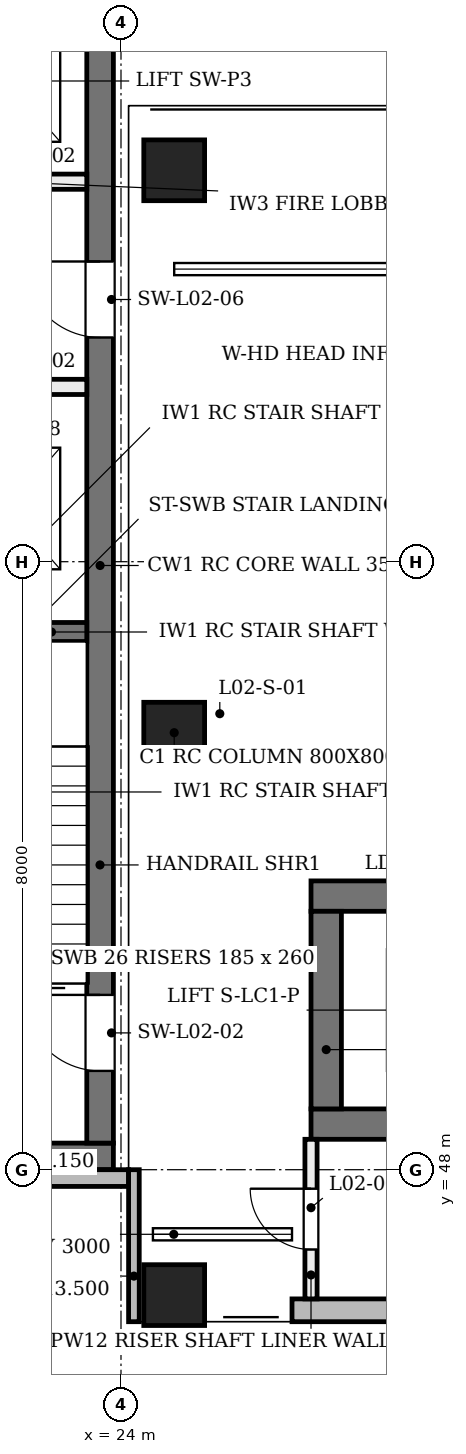
"""IFC4 building model, lengths in metres.
Left out: names, types, materials, properties, quantities, classifications, styles, units other than length and angle.
Written with IfcOpenShell. Run it as: python <this file> out.ifc"""

import sys

from ifc_helpers import new_model, si_unit, direction, frame, frame_2d, origin, origin_2d, place, context, subcontext, project, spatial, rectangle, extrude, element, fill, save


model = new_model("IFC4")
c1 = context("Model", 3, precision=1e-05, world=origin(), true_north=direction((0.0, 1.0)))
c2 = subcontext(c1, "Body", "Model", "MODEL_VIEW")
j1 = project(units=[si_unit("LENGTHUNIT", "METRE"), si_unit("PLANEANGLEUNIT", "RADIAN")], contexts=[c1])
p1 = place(None, origin())
s1 = spatial("IfcSite", under=j1, at=p1, CompositionType="ELEMENT")
p2 = place(p1, origin())
s2 = spatial("IfcBuilding", under=s1, at=p2, CompositionType="ELEMENT")
p3 = place(p2, frame((0.0, 0.0, 9.6)))
s3 = spatial("IfcBuildingStorey", under=s2, at=p3, CompositionType="ELEMENT", Elevation=9.6)
p4 = place(p3, frame((26.5, 48.6, 0.0), z_axis=(0.0, 0.0, 1.0), x_axis=(1.0, 0.0, 0.0)))
e1 = element("IfcWall", 1, at=p4, inside=s3, PredefinedType="SHEAR", context=c2, shape_type="SweptSolid", body=[
    extrude(rectangle(XDim=6.0, YDim=0.4, at=frame_2d((3.0, 0.0))), origin(), (0.0, 0.0, 1.0), 4.58),
])
p5 = place(p3, frame((26.5, 51.6, 0.0), z_axis=(0.0, 0.0, 1.0), x_axis=(1.0, 0.0, 0.0)))
e2 = element("IfcWall", 2, at=p5, inside=s3, PredefinedType="SHEAR", context=c2, shape_type="SweptSolid", body=[
    extrude(rectangle(XDim=6.0, YDim=0.4, at=frame_2d((3.0, 0.0))), origin(), (0.0, 0.0, 1.0), 4.58),
])
p6 = place(p5, frame((1.15, 0.0, 0.0)))
e3 = element("IfcOpeningElement", 3, at=p6, cuts=e2, PredefinedType="OPENING", context=c2, shape_type="SweptSolid", body=[
    extrude(rectangle(XDim=1.1, YDim=2.1, at=frame_2d((0.55, 1.05))), frame((0.0, 0.21, 0.0), z_axis=(0.0, -1.0, 0.0), x_axis=(1.0, 0.0, 0.0)), (0.0, 0.0, 1.0), 0.42),
])
p7 = place(p5, frame((3.75, 0.0, 0.0)))
e4 = element("IfcOpeningElement", 4, at=p7, cuts=e2, PredefinedType="OPENING", context=c2, shape_type="SweptSolid", body=[
    extrude(rectangle(XDim=1.1, YDim=2.1, at=frame_2d((0.55, 1.05))), frame((0.0, 0.21, 0.0), z_axis=(0.0, -1.0, 0.0), x_axis=(1.0, 0.0, 0.0)), (0.0, 0.0, 1.0), 0.42),
])
p8 = place(p3, frame((26.7, 48.8, 0.0), z_axis=(0.0, 0.0, 1.0), x_axis=(0.0, 1.0, 0.0)))
e5 = element("IfcWall", 5, at=p8, inside=s3, PredefinedType="SHEAR", context=c2, shape_type="SweptSolid", body=[
    extrude(rectangle(XDim=2.6, YDim=0.4, at=frame_2d((1.3, 0.0))), origin(), (0.0, 0.0, 1.0), 4.58),
])
p9 = place(p3, frame((16.0, 48.175, 0.0), z_axis=(0.0, 0.0, 1.0), x_axis=(1.0, 0.0, 0.0)))
e6 = element("IfcWall", 6, at=p9, inside=s3, PredefinedType="SHEAR", context=c2, shape_type="SweptSolid", body=[
    extrude(rectangle(XDim=7.9, YDim=0.35, at=frame_2d((3.95, 0.0))), origin(), (0.0, 0.0, 1.0), 4.58),
])
p10 = place(p3, frame((23.725, 48.35, 0.0), z_axis=(0.0, 0.0, 1.0), x_axis=(0.0, 1.0, 0.0)))
e7 = element("IfcWall", 7, at=p10, inside=s3, PredefinedType="SHEAR", context=c2, shape_type="SweptSolid", body=[
    extrude(rectangle(XDim=15.2, YDim=0.35, at=frame_2d((7.6, 0.0))), origin(), (0.0, 0.0, 1.0), 4.58),
])
p11 = place(p10, frame((0.95, 0.0, 0.0)))
e8 = element("IfcOpeningElement", 8, at=p11, cuts=e7, PredefinedType="OPENING", context=c2, shape_type="SweptSolid", body=[
    extrude(rectangle(XDim=1.0, YDim=2.1, at=frame_2d((0.5, 1.05))), frame((0.0, 0.185, 0.0), z_axis=(0.0, -1.0, 0.0), x_axis=(1.0, 0.0, 0.0)), (0.0, 0.0, 1.0), 0.37),
])
p12 = place(p10, frame((10.6, 0.0, 0.0)))
e9 = element("IfcOpeningElement", 9, at=p12, cuts=e7, PredefinedType="OPENING", context=c2, shape_type="SweptSolid", body=[
    extrude(rectangle(XDim=1.0, YDim=2.1, at=frame_2d((0.5, 1.05))), frame((0.0, 0.185, 0.0), z_axis=(0.0, -1.0, 0.0), x_axis=(1.0, 0.0, 0.0)), (0.0, 0.0, 1.0), 0.37),
])
for number, where, z_axis, x_axis in (
    (10, (24.7, 46.6, 0.0), (0.0, -0.204, 0.979), (1.0, 0.0, 0.0)),
    (11, (24.7, 54.0, 0.0), (0.0, -0.204, 0.979), (1.0, 0.0, 0.0)),
    (12, (24.7, 61.4, 0.0), (0.0, -0.204, 0.979), (1.0, 0.0, 0.0)),
):
    element("IfcColumn", number, at=place(p3, frame(where, z_axis=z_axis, x_axis=x_axis)), inside=s3, PredefinedType="COLUMN", context=c2, shape_type="SweptSolid", body=[
        extrude(rectangle(XDim=0.8, YDim=0.8, at=origin_2d()), origin(), (0.0, 0.0, 1.0), 4.903),
    ])
p13 = place(p3, frame((26.25, 46.15, 0.0), z_axis=(0.0, 0.0, 1.0), x_axis=(1.0, 0.0, 0.0)))
e13 = element("IfcWall", 13, at=p13, inside=s3, PredefinedType="SOLIDWALL", context=c2, shape_type="SweptSolid", body=[
    extrude(rectangle(XDim=6.5, YDim=0.3, at=frame_2d((3.25, 0.0))), origin(), (0.0, 0.0, 1.0), 3.9),
])
p14 = place(p3, frame((24.9, 59.85, 4.1), z_axis=(0.0, 0.0, 1.0), x_axis=(1.0, 0.0, 0.0)))
e14 = element("IfcWall", 14, at=p14, inside=s3, PredefinedType="SOLIDWALL", context=c2, shape_type="SweptSolid", body=[
    extrude(rectangle(XDim=6.9, YDim=0.15, at=frame_2d((3.45, 0.0))), origin(), (0.0, 0.0, 1.0), 0.48),
])
p15 = place(p3, frame((15.9, 47.89, 0.0), z_axis=(0.0, 0.0, 1.0), x_axis=(1.0, 0.0, 0.0)))
e15 = element("IfcWall", 15, at=p15, inside=s3, PredefinedType="SOLIDWALL", context=c2, shape_type="SweptSolid", body=[
    extrude(rectangle(XDim=8.2, YDim=0.22, at=frame_2d((4.1, 0.0))), origin(), (0.0, 0.0, 1.0), 3.9),
])
p16 = place(p15, frame((1.108, 0.0, 0.9)))
e16 = element("IfcOpeningElement", 16, at=p16, cuts=e15, PredefinedType="OPENING", context=c2, shape_type="SweptSolid", body=[
    extrude(rectangle(XDim=0.45, YDim=2.6, at=frame_2d((0.225, 1.3))), frame((0.0, 0.12, 0.0), z_axis=(0.0, -1.0, 0.0), x_axis=(1.0, 0.0, 0.0)), (0.0, 0.0, 1.0), 0.24),
])
p17 = place(p15, frame((3.775, 0.0, 0.9)))
e17 = element("IfcOpeningElement", 17, at=p17, cuts=e15, PredefinedType="OPENING", context=c2, shape_type="SweptSolid", body=[
    extrude(rectangle(XDim=0.45, YDim=2.6, at=frame_2d((0.225, 1.3))), frame((0.0, 0.12, 0.0), z_axis=(0.0, -1.0, 0.0), x_axis=(1.0, 0.0, 0.0)), (0.0, 0.0, 1.0), 0.24),
])
p18 = place(p15, frame((6.442, 0.0, 0.9)))
e18 = element("IfcOpeningElement", 18, at=p18, cuts=e15, PredefinedType="OPENING", context=c2, shape_type="SweptSolid", body=[
    extrude(rectangle(XDim=0.45, YDim=2.6, at=frame_2d((0.225, 1.3))), frame((0.0, 0.12, 0.0), z_axis=(0.0, -1.0, 0.0), x_axis=(1.0, 0.0, 0.0)), (0.0, 0.0, 1.0), 0.24),
])
p19 = place(p3, frame((24.17, 46.0, 0.0), z_axis=(0.0, 0.0, 1.0), x_axis=(0.0, 1.0, 0.0)))
e19 = element("IfcWall", 19, at=p19, inside=s3, PredefinedType="SOLIDWALL", context=c2, shape_type="SweptSolid", body=[
    extrude(rectangle(XDim=2.0, YDim=0.14, at=frame_2d((1.0, 0.0))), origin(), (0.0, 0.0, 1.0), 3.9),
])
p20 = place(p3, frame((20.45, 55.075, 0.0), z_axis=(0.0, 0.0, 1.0), x_axis=(1.0, 0.0, 0.0)))
e20 = element("IfcWall", 20, at=p20, inside=s3, PredefinedType="SOLIDWALL", context=c2, shape_type="SweptSolid", body=[
    extrude(rectangle(XDim=3.1, YDim=0.25, at=frame_2d((1.55, 0.0))), origin(), (0.0, 0.0, 1.0), 4.55),
])
p21 = place(p3, frame((16.35, 58.3, 0.0), z_axis=(0.0, 0.0, 1.0), x_axis=(1.0, 0.0, 0.0)))
e21 = element("IfcWall", 21, at=p21, inside=s3, PredefinedType="SOLIDWALL", context=c2, shape_type="SweptSolid", body=[
    extrude(rectangle(XDim=7.2, YDim=0.2, at=frame_2d((3.6, 0.0))), origin(), (0.0, 0.0, 1.0), 4.55),
])
p22 = place(p21, frame((0.5, 0.0, 0.0)))
e22 = element("IfcOpeningElement", 22, at=p22, cuts=e21, PredefinedType="OPENING", context=c2, shape_type="SweptSolid", body=[
    extrude(rectangle(XDim=1.1, YDim=2.1, at=frame_2d((0.55, 1.05))), frame((0.0, 0.11, 0.0), z_axis=(0.0, -1.0, 0.0), x_axis=(1.0, 0.0, 0.0)), (0.0, 0.0, 1.0), 0.22),
])
p23 = place(p21, frame((5.6, 0.0, 0.0)))
e23 = element("IfcOpeningElement", 23, at=p23, cuts=e21, PredefinedType="OPENING", context=c2, shape_type="SweptSolid", body=[
    extrude(rectangle(XDim=1.1, YDim=2.1, at=frame_2d((0.55, 1.05))), frame((0.0, 0.11, 0.0), z_axis=(0.0, -1.0, 0.0), x_axis=(1.0, 0.0, 0.0)), (0.0, 0.0, 1.0), 0.22),
])
p24 = place(p21, frame((3.1, 0.0, 0.0)))
e24 = element("IfcOpeningElement", 24, at=p24, cuts=e21, PredefinedType="OPENING", context=c2, shape_type="SweptSolid", body=[
    extrude(rectangle(XDim=1.0, YDim=2.1, at=frame_2d((0.5, 1.05))), frame((0.0, 0.11, 0.0), z_axis=(0.0, -1.0, 0.0), x_axis=(1.0, 0.0, 0.0)), (0.0, 0.0, 1.0), 0.22),
])
p25 = place(p3, frame((16.35, 61.0, 0.0), z_axis=(0.0, 0.0, 1.0), x_axis=(1.0, 0.0, 0.0)))
e25 = element("IfcWall", 25, at=p25, inside=s3, PredefinedType="SOLIDWALL", context=c2, shape_type="SweptSolid", body=[
    extrude(rectangle(XDim=7.2, YDim=0.2, at=frame_2d((3.6, 0.0))), origin(), (0.0, 0.0, 1.0), 4.55),
])
p26 = place(p25, frame((0.5, 0.0, 0.0)))
e26 = element("IfcOpeningElement", 26, at=p26, cuts=e25, PredefinedType="OPENING", context=c2, shape_type="SweptSolid", body=[
    extrude(rectangle(XDim=1.1, YDim=2.1, at=frame_2d((0.55, 1.05))), frame((0.0, 0.11, 0.0), z_axis=(0.0, -1.0, 0.0), x_axis=(1.0, 0.0, 0.0)), (0.0, 0.0, 1.0), 0.22),
])
p27 = place(p25, frame((5.6, 0.0, 0.0)))
e27 = element("IfcOpeningElement", 27, at=p27, cuts=e25, PredefinedType="OPENING", context=c2, shape_type="SweptSolid", body=[
    extrude(rectangle(XDim=1.1, YDim=2.1, at=frame_2d((0.55, 1.05))), frame((0.0, 0.11, 0.0), z_axis=(0.0, -1.0, 0.0), x_axis=(1.0, 0.0, 0.0)), (0.0, 0.0, 1.0), 0.22),
])
p28 = place(p25, frame((3.1, 0.0, 0.0)))
e28 = element("IfcOpeningElement", 28, at=p28, cuts=e25, PredefinedType="OPENING", context=c2, shape_type="SweptSolid", body=[
    extrude(rectangle(XDim=1.0, YDim=2.1, at=frame_2d((0.5, 1.05))), frame((0.0, 0.11, 0.0), z_axis=(0.0, -1.0, 0.0), x_axis=(1.0, 0.0, 0.0)), (0.0, 0.0, 1.0), 0.22),
])
p29 = place(p3, frame((26.5, 46.3, 0.0), z_axis=(0.0, 0.0, 1.0), x_axis=(0.0, 1.0, 0.0)))
e29 = element("IfcWall", 29, at=p29, inside=s3, PredefinedType="PARTITIONING", context=c2, shape_type="SweptSolid", body=[
    extrude(rectangle(XDim=2.1, YDim=0.16, at=frame_2d((1.05, 0.0))), origin(), (0.0, 0.0, 1.0), 4.56),
])
p30 = place(p29, frame((0.65, 0.0, 0.0)))
e30 = element("IfcOpeningElement", 30, at=p30, cuts=e29, PredefinedType="OPENING", context=c2, shape_type="SweptSolid", body=[
    extrude(rectangle(XDim=0.8, YDim=2.1, at=frame_2d((0.4, 1.05))), frame((0.0, 0.09, 0.0), z_axis=(0.0, -1.0, 0.0), x_axis=(1.0, 0.0, 0.0)), (0.0, 0.0, 1.0), 0.18),
])
p31 = place(p11, frame((1.0, 0.0, 0.0), z_axis=(0.0, 0.0, 1.0), x_axis=(-1.0, 0.0, 0.0)))
e31 = element("IfcDoor", 31, at=p31, inside=s3, OperationType="SINGLE_SWING_RIGHT", PredefinedType="DOOR", context=c2, shape_type="SweptSolid", body=[
    extrude(rectangle(XDim=1.0, YDim=2.1, at=frame_2d((0.5, 1.05))), frame((0.0, 0.025, 0.0), z_axis=(0.0, -1.0, 0.0), x_axis=(1.0, 0.0, 0.0)), (0.0, 0.0, 1.0), 0.05),
])
fill(e8, e31)
p32 = place(p12, frame((1.0, 0.0, 0.0), z_axis=(0.0, 0.0, 1.0), x_axis=(-1.0, 0.0, 0.0)))
e32 = element("IfcDoor", 32, at=p32, inside=s3, OperationType="SINGLE_SWING_RIGHT", PredefinedType="DOOR", context=c2, shape_type="SweptSolid", body=[
    extrude(rectangle(XDim=1.0, YDim=2.1, at=frame_2d((0.5, 1.05))), frame((0.0, 0.025, 0.0), z_axis=(0.0, -1.0, 0.0), x_axis=(1.0, 0.0, 0.0)), (0.0, 0.0, 1.0), 0.05),
])
fill(e9, e32)
p33 = place(p30, frame((0.8, 0.0, 0.0), z_axis=(0.0, 0.0, 1.0), x_axis=(-1.0, 0.0, 0.0)))
e33 = element("IfcDoor", 33, at=p33, inside=s3, OperationType="SINGLE_SWING_RIGHT", PredefinedType="DOOR", context=c2, shape_type="SweptSolid", body=[
    extrude(rectangle(XDim=0.8, YDim=2.1, at=frame_2d((0.4, 1.05))), frame((0.0, 0.025, 0.0), z_axis=(0.0, -1.0, 0.0), x_axis=(1.0, 0.0, 0.0)), (0.0, 0.0, 1.0), 0.05),
])
fill(e30, e33)
save(model, sys.argv[1])
